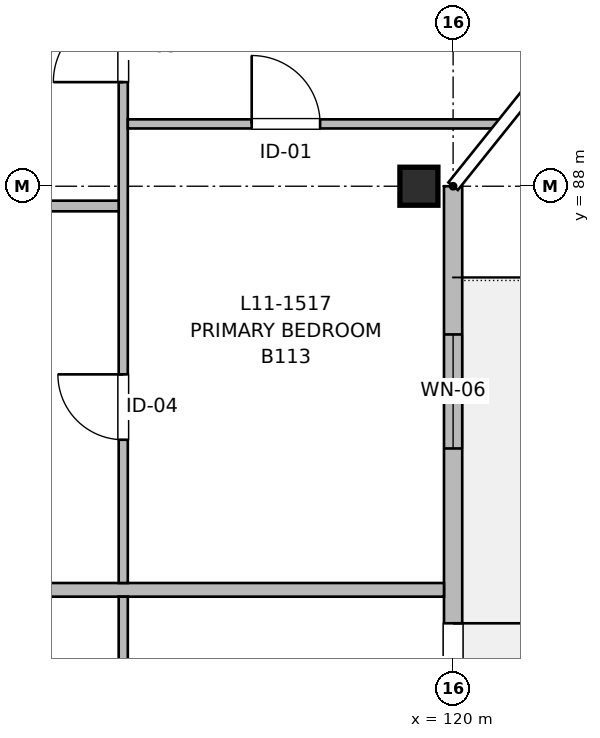
"""IFC4 building model, lengths in metres.
Left out: names, types, materials, properties, quantities, classifications, styles, units other than length and angle.
Written with IfcOpenShell. Run it as: python <this file> out.ifc"""

import sys

from ifc_helpers import new_model, si_unit, direction, frame, frame_2d, origin, origin_2d, place, context, subcontext, project, spatial, rectangle, extrude, element, fill, save


model = new_model("IFC4")
c1 = context("Model", 3, precision=1e-05, world=origin(), true_north=direction((0.0, 1.0)))
c2 = subcontext(c1, "Body", "Model", "MODEL_VIEW")
j1 = project(units=[si_unit("LENGTHUNIT", "METRE"), si_unit("PLANEANGLEUNIT", "RADIAN")], contexts=[c1])
p1 = place(None, origin())
s1 = spatial("IfcSite", under=j1, at=p1, CompositionType="ELEMENT")
p2 = place(p1, origin())
s2 = spatial("IfcBuilding", under=s1, at=p2, CompositionType="ELEMENT")
p3 = place(p2, frame((0.0, 0.0, 36.16)))
s3 = spatial("IfcBuildingStorey", under=s2, at=p3, CompositionType="ELEMENT", Elevation=36.16)
p4 = place(p3, frame((119.55, 88.0, 0.0), z_axis=(0.0, 0.0, 1.0), x_axis=(1.0, 0.0, 0.0)))
e1 = element("IfcColumn", 1, at=p4, inside=s3, PredefinedType="COLUMN", context=c2, shape_type="SweptSolid", body=[
    extrude(rectangle(XDim=0.5, YDim=0.5, at=origin_2d()), origin(), (0.0, 0.0, 1.0), 3.2),
])
p5 = place(p3, frame((120.0, 88.0, 0.0), z_axis=(0.0, 0.0, 1.0), x_axis=(0.0, -1.0, 0.0)))
e2 = element("IfcWall", 2, at=p5, inside=s3, PredefinedType="SOLIDWALL", context=c2, shape_type="SweptSolid", body=[
    extrude(rectangle(XDim=23.6, YDim=0.24, at=frame_2d((11.8, 0.0))), origin(), (0.0, 0.0, 1.0), 2.98),
])
p6 = place(p5, frame((5.75, 0.0, 0.0)))
e3 = element("IfcOpeningElement", 3, at=p6, cuts=e2, PredefinedType="OPENING", context=c2, shape_type="SweptSolid", body=[
    extrude(rectangle(XDim=1.2, YDim=2.2, at=frame_2d((0.6, 1.1))), frame((0.0, 0.13, 0.0), z_axis=(0.0, -1.0, 0.0), x_axis=(1.0, 0.0, 0.0)), (0.0, 0.0, 1.0), 0.26),
])
p7 = place(p5, frame((7.2, 0.0, 0.72)))
e4 = element("IfcOpeningElement", 4, at=p7, cuts=e2, PredefinedType="OPENING", context=c2, shape_type="SweptSolid", body=[
    extrude(rectangle(XDim=2.0, YDim=1.5, at=frame_2d((1.0, 0.75))), frame((0.0, 0.13, 0.0), z_axis=(0.0, -1.0, 0.0), x_axis=(1.0, 0.0, 0.0)), (0.0, 0.0, 1.0), 0.26),
])
p8 = place(p5, frame((16.2, 0.0, 0.67)))
e5 = element("IfcOpeningElement", 5, at=p8, cuts=e2, PredefinedType="OPENING", context=c2, shape_type="SweptSolid", body=[
    extrude(rectangle(XDim=2.1, YDim=1.55, at=frame_2d((1.05, 0.775))), frame((0.0, 0.13, 0.0), z_axis=(0.0, -1.0, 0.0), x_axis=(1.0, 0.0, 0.0)), (0.0, 0.0, 1.0), 0.26),
])
p9 = place(p5, frame((11.225, 0.0, 0.82)))
e6 = element("IfcOpeningElement", 6, at=p9, cuts=e2, PredefinedType="OPENING", context=c2, shape_type="SweptSolid", body=[
    extrude(rectangle(XDim=1.5, YDim=1.4, at=frame_2d((0.75, 0.7))), frame((0.0, 0.13, 0.0), z_axis=(0.0, -1.0, 0.0), x_axis=(1.0, 0.0, 0.0)), (0.0, 0.0, 1.0), 0.26),
])
p10 = place(p5, frame((1.95, 0.0, 0.82)))
e7 = element("IfcOpeningElement", 7, at=p10, cuts=e2, PredefinedType="OPENING", context=c2, shape_type="SweptSolid", body=[
    extrude(rectangle(XDim=1.5, YDim=1.4, at=frame_2d((0.75, 0.7))), frame((0.0, 0.13, 0.0), z_axis=(0.0, -1.0, 0.0), x_axis=(1.0, 0.0, 0.0)), (0.0, 0.0, 1.0), 0.26),
])
p11 = place(p3, frame((113.28, 82.69, 0.0), z_axis=(0.0, 0.0, 1.0), x_axis=(1.0, 0.0, 0.0)))
e8 = element("IfcWall", 8, at=p11, inside=s3, PredefinedType="PARTITIONING", context=c2, shape_type="SweptSolid", body=[
    extrude(rectangle(XDim=6.6, YDim=0.18, at=frame_2d((3.3, 0.0))), origin(), (0.0, 0.0, 1.0), 2.935),
])
p12 = place(p3, frame((115.66, 73.5, 0.0), z_axis=(0.0, 0.0, 1.0), x_axis=(0.0, 1.0, 0.0)))
e9 = element("IfcWall", 9, at=p12, inside=s3, PredefinedType="PARTITIONING", context=c2, shape_type="SweptSolid", body=[
    extrude(rectangle(XDim=9.1, YDim=0.12, at=frame_2d((4.55, 0.0))), origin(), (0.0, 0.0, 1.0), 2.935),
])
p13 = place(p12, frame((1.592, 0.0, 0.0)))
e10 = element("IfcOpeningElement", 10, at=p13, cuts=e9, PredefinedType="OPENING", context=c2, shape_type="SweptSolid", body=[
    extrude(rectangle(XDim=0.94, YDim=2.1, at=frame_2d((0.47, 1.05))), frame((0.0, 0.07, 0.0), z_axis=(0.0, -1.0, 0.0), x_axis=(1.0, 0.0, 0.0)), (0.0, 0.0, 1.0), 0.14),
])
p14 = place(p12, frame((5.565, 0.0, 0.0)))
e11 = element("IfcOpeningElement", 11, at=p14, cuts=e9, PredefinedType="OPENING", context=c2, shape_type="SweptSolid", body=[
    extrude(rectangle(XDim=0.92, YDim=2.1, at=frame_2d((0.46, 1.05))), frame((0.0, 0.07, 0.0), z_axis=(0.0, -1.0, 0.0), x_axis=(1.0, 0.0, 0.0)), (0.0, 0.0, 1.0), 0.14),
])
p15 = place(p3, frame((115.66, 82.78, 0.0), z_axis=(0.0, 0.0, 1.0), x_axis=(0.0, 1.0, 0.0)))
e12 = element("IfcWall", 12, at=p15, inside=s3, PredefinedType="PARTITIONING", context=c2, shape_type="SweptSolid", body=[
    extrude(rectangle(XDim=10.78, YDim=0.12, at=frame_2d((5.39, 0.0))), origin(), (0.0, 0.0, 1.0), 2.935),
])
p16 = place(p15, frame((1.885, 0.0, 0.0)))
e13 = element("IfcOpeningElement", 13, at=p16, cuts=e12, PredefinedType="OPENING", context=c2, shape_type="SweptSolid", body=[
    extrude(rectangle(XDim=0.86, YDim=2.1, at=frame_2d((0.43, 1.05))), frame((0.0, 0.07, 0.0), z_axis=(0.0, -1.0, 0.0), x_axis=(1.0, 0.0, 0.0)), (0.0, 0.0, 1.0), 0.14),
])
p17 = place(p15, frame((6.59, 0.0, 0.0)))
e14 = element("IfcOpeningElement", 14, at=p17, cuts=e12, PredefinedType="OPENING", context=c2, shape_type="SweptSolid", body=[
    extrude(rectangle(XDim=0.92, YDim=2.1, at=frame_2d((0.46, 1.05))), frame((0.0, 0.07, 0.0), z_axis=(0.0, -1.0, 0.0), x_axis=(1.0, 0.0, 0.0)), (0.0, 0.0, 1.0), 0.14),
])
p18 = place(p3, frame((113.28, 87.74, 0.0), z_axis=(0.0, 0.0, 1.0), x_axis=(1.0, 0.0, 0.0)))
e15 = element("IfcWall", 15, at=p18, inside=s3, PredefinedType="PARTITIONING", context=c2, shape_type="SweptSolid", body=[
    extrude(rectangle(XDim=2.32, YDim=0.14, at=frame_2d((1.16, 0.0))), origin(), (0.0, 0.0, 1.0), 2.935),
])
p19 = place(p3, frame((115.72, 88.82, 0.0), z_axis=(0.0, 0.0, 1.0), x_axis=(1.0, 0.0, 0.0)))
e16 = element("IfcWall", 16, at=p19, inside=s3, PredefinedType="PARTITIONING", context=c2, shape_type="SweptSolid", body=[
    extrude(rectangle(XDim=4.887, YDim=0.12, at=frame_2d((2.443, 0.0))), origin(), (0.0, 0.0, 1.0), 2.935),
])
p20 = place(p19, frame((1.63, 0.0, 0.0)))
e17 = element("IfcOpeningElement", 17, at=p20, cuts=e16, PredefinedType="OPENING", context=c2, shape_type="SweptSolid", body=[
    extrude(rectangle(XDim=0.9, YDim=2.1, at=frame_2d((0.45, 1.05))), frame((0.0, 0.07, 0.0), z_axis=(0.0, -1.0, 0.0), x_axis=(1.0, 0.0, 0.0)), (0.0, 0.0, 1.0), 0.14),
])
p21 = place(p6, origin())
e18 = element("IfcDoor", 18, at=p21, inside=s3, OperationType="SINGLE_SWING_LEFT", PredefinedType="DOOR", context=c2, shape_type="SweptSolid", body=[
    extrude(rectangle(XDim=1.2, YDim=2.2, at=frame_2d((0.6, 1.1))), frame((0.0, 0.025, 0.0), z_axis=(0.0, -1.0, 0.0), x_axis=(1.0, 0.0, 0.0)), (0.0, 0.0, 1.0), 0.05),
])
fill(e3, e18)
p22 = place(p16, origin())
e19 = element("IfcDoor", 19, at=p22, inside=s3, OperationType="SINGLE_SWING_RIGHT", PredefinedType="DOOR", context=c2, shape_type="SweptSolid", body=[
    extrude(rectangle(XDim=0.86, YDim=2.1, at=frame_2d((0.43, 1.05))), frame((0.0, 0.025, 0.0), z_axis=(0.0, -1.0, 0.0), x_axis=(1.0, 0.0, 0.0)), (0.0, 0.0, 1.0), 0.05),
])
fill(e13, e19)
p23 = place(p17, origin())
e20 = element("IfcDoor", 20, at=p23, inside=s3, OperationType="SINGLE_SWING_LEFT", PredefinedType="DOOR", context=c2, shape_type="SweptSolid", body=[
    extrude(rectangle(XDim=0.92, YDim=2.1, at=frame_2d((0.46, 1.05))), frame((0.0, 0.025, 0.0), z_axis=(0.0, -1.0, 0.0), x_axis=(1.0, 0.0, 0.0)), (0.0, 0.0, 1.0), 0.05),
])
fill(e14, e20)
p24 = place(p20, origin())
e21 = element("IfcDoor", 21, at=p24, inside=s3, OperationType="SINGLE_SWING_LEFT", PredefinedType="DOOR", context=c2, shape_type="SweptSolid", body=[
    extrude(rectangle(XDim=0.9, YDim=2.1, at=frame_2d((0.45, 1.05))), frame((0.0, 0.025, 0.0), z_axis=(0.0, -1.0, 0.0), x_axis=(1.0, 0.0, 0.0)), (0.0, 0.0, 1.0), 0.05),
])
fill(e17, e21)
p25 = place(p10, origin())
e22 = element("IfcWindow", 22, at=p25, inside=s3, PartitioningType="SINGLE_PANEL", PredefinedType="WINDOW", context=c2, shape_type="SweptSolid", body=[
    extrude(rectangle(XDim=1.5, YDim=1.4, at=frame_2d((0.75, 0.7))), frame((0.0, 0.03, 0.0), z_axis=(0.0, -1.0, 0.0), x_axis=(1.0, 0.0, 0.0)), (0.0, 0.0, 1.0), 0.06),
])
fill(e7, e22)
save(model, sys.argv[1])
